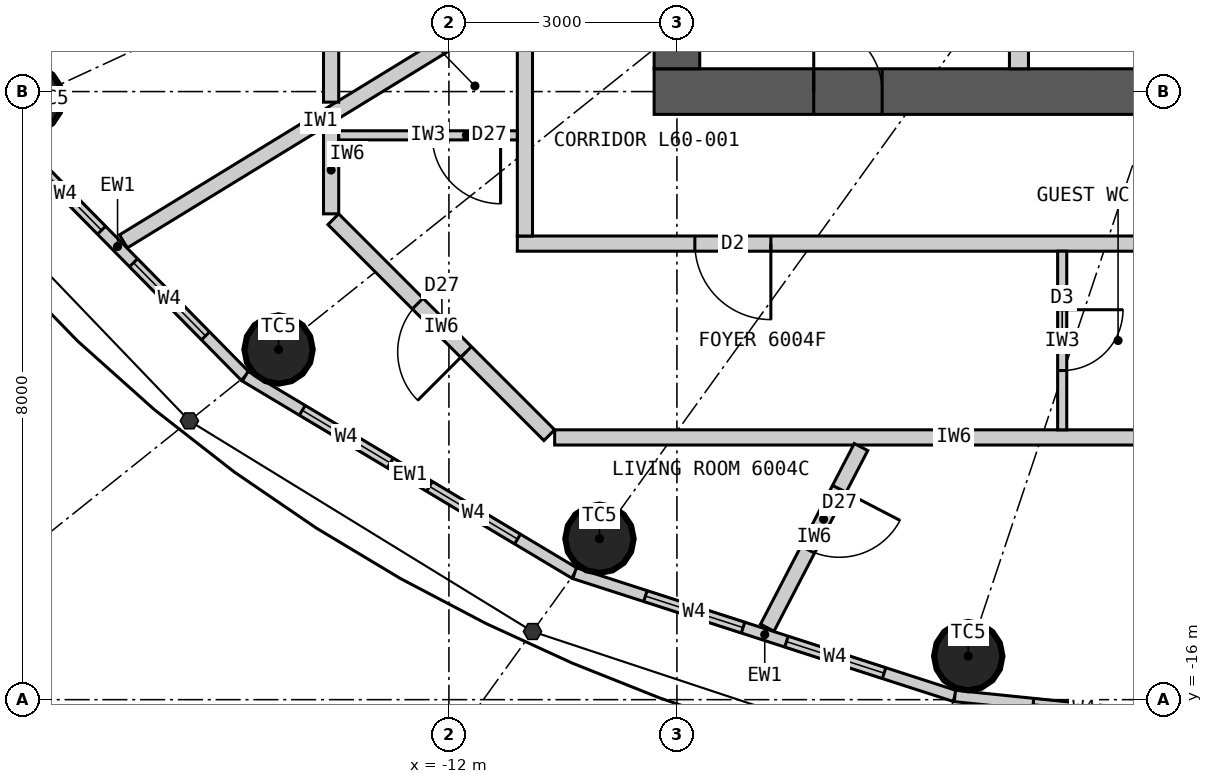
"""IFC4 building model, lengths in metres.
Left out: names, types, materials, properties, quantities, classifications, styles, units other than length and angle.
Written with IfcOpenShell. Run it as: python <this file> out.ifc"""

import sys

from ifc_helpers import new_model, si_unit, direction, frame, frame_2d, origin, origin_2d, place, context, subcontext, project, spatial, rectangle, circle, extrude, element, fill, save


model = new_model("IFC4")
c1 = context("Model", 3, precision=1e-05, world=origin(), true_north=direction((0.0, 1.0)))
c2 = subcontext(c1, "Body", "Model", "MODEL_VIEW")
j1 = project(units=[si_unit("LENGTHUNIT", "METRE"), si_unit("PLANEANGLEUNIT", "RADIAN")], contexts=[c1])
p1 = place(None, origin())
s1 = spatial("IfcSite", under=j1, at=p1, CompositionType="ELEMENT")
p2 = place(p1, origin())
s2 = spatial("IfcBuilding", under=s1, at=p2, CompositionType="ELEMENT")
p3 = place(p2, frame((0.0, 0.0, 222.6)))
s3 = spatial("IfcBuildingStorey", under=s2, at=p3, CompositionType="ELEMENT", Elevation=222.6)
for number, where, z_axis, x_axis in (
    (1, (-17.532, -8.098, 0.0), (0.0, 0.0, 1.0), (1.0, 0.0, 0.0)),
    (2, (-14.241, -11.393, 0.0), (0.0, 0.0, 1.0), (1.0, 0.0, 0.0)),
    (3, (-10.019, -13.883, 0.0), (0.0, 0.0, 1.0), (1.0, 0.0, 0.0)),
    (4, (-5.167, -15.427, 0.0), (0.0, 0.0, 1.0), (1.0, 0.0, 0.0)),
):
    element("IfcColumn", number, at=place(p3, frame(where, z_axis=z_axis, x_axis=x_axis)), inside=s3, PredefinedType="COLUMN", context=c2, shape_type="SweptSolid", body=[
        extrude(circle(Radius=0.45, at=origin_2d()), origin(), (0.0, 0.0, 1.0), 3.3),
    ])
p4 = place(p3, frame((9.3, -8.0, 0.0), z_axis=(0.0, 0.0, 1.0), x_axis=(-1.0, 0.0, 0.0)))
e5 = element("IfcWall", 5, at=p4, inside=s3, PredefinedType="SHEAR", context=c2, shape_type="SweptSolid", body=[
    extrude(rectangle(XDim=18.6, YDim=0.6, at=frame_2d((9.3, 0.0))), origin(), (0.0, 0.0, 1.0), 3.3),
])
p5 = place(p4, frame((8.0, 0.0, 0.0)))
e6 = element("IfcOpeningElement", 6, at=p5, cuts=e5, PredefinedType="OPENING", context=c2, shape_type="SweptSolid", body=[
    extrude(rectangle(XDim=1.2, YDim=2.2, at=frame_2d((0.6, 1.1))), frame((0.0, 0.31, 0.0), z_axis=(0.0, -1.0, 0.0), x_axis=(1.0, 0.0, 0.0)), (0.0, 0.0, 1.0), 0.62),
])
p6 = place(p4, frame((15.6, 0.0, 0.0)))
e7 = element("IfcOpeningElement", 7, at=p6, cuts=e5, PredefinedType="OPENING", context=c2, shape_type="SweptSolid", body=[
    extrude(rectangle(XDim=0.9, YDim=2.2, at=frame_2d((0.45, 1.1))), frame((0.0, 0.31, 0.0), z_axis=(0.0, -1.0, 0.0), x_axis=(1.0, 0.0, 0.0)), (0.0, 0.0, 1.0), 0.62),
])
p7 = place(p3, frame((-9.0, 7.7, 0.0), z_axis=(0.0, 0.0, 1.0), x_axis=(0.0, -1.0, 0.0)))
e8 = element("IfcWall", 8, at=p7, inside=s3, PredefinedType="SHEAR", context=c2, shape_type="SweptSolid", body=[
    extrude(rectangle(XDim=15.4, YDim=0.6, at=frame_2d((7.7, 0.0))), origin(), (0.0, 0.0, 1.0), 3.3),
])
p8 = place(p7, frame((6.8, 0.0, 0.0)))
e9 = element("IfcOpeningElement", 9, at=p8, cuts=e8, PredefinedType="OPENING", context=c2, shape_type="SweptSolid", body=[
    extrude(rectangle(XDim=1.8, YDim=2.2, at=frame_2d((0.9, 1.1))), frame((0.0, 0.31, 0.0), z_axis=(0.0, -1.0, 0.0), x_axis=(1.0, 0.0, 0.0)), (0.0, 0.0, 1.0), 0.62),
])
p9 = place(p3, frame((-4.5, -7.7, 0.0), z_axis=(0.0, 0.0, 1.0), x_axis=(0.0, 1.0, 0.0)))
e10 = element("IfcWall", 10, at=p9, inside=s3, PredefinedType="PARTITIONING", context=c2, shape_type="SweptSolid", body=[
    extrude(rectangle(XDim=3.2, YDim=0.25, at=frame_2d((1.6, 0.0))), origin(), (0.0, 0.0, 1.0), 3.3),
])
p10 = place(p3, frame((-18.04, -8.332, 0.0), z_axis=(0.0, 0.0, 1.0), x_axis=(0.701527379618, -0.712642501993, 0.0)))
e11 = element("IfcWall", 11, at=p10, inside=s3, PredefinedType="ELEMENTEDWALL", context=c2, shape_type="SweptSolid", body=[
    extrude(rectangle(XDim=4.788, YDim=0.15, at=frame_2d((2.394, 0.0))), origin(), (0.0, 0.0, 1.0), 3.12),
])
p11 = place(p10, frame((0.744, 0.0, 0.9)))
e12 = element("IfcOpeningElement", 12, at=p11, cuts=e11, PredefinedType="OPENING", context=c2, shape_type="SweptSolid", body=[
    extrude(rectangle(XDim=1.35, YDim=1.9, at=frame_2d((0.675, 0.95))), frame((0.0, 0.085, 0.0), z_axis=(0.0, -1.0, 0.0), x_axis=(1.0, 0.0, 0.0)), (0.0, 0.0, 1.0), 0.17),
])
p12 = place(p10, frame((2.694, 0.0, 0.9)))
e13 = element("IfcOpeningElement", 13, at=p12, cuts=e11, PredefinedType="OPENING", context=c2, shape_type="SweptSolid", body=[
    extrude(rectangle(XDim=1.35, YDim=1.9, at=frame_2d((0.675, 0.95))), frame((0.0, 0.085, 0.0), z_axis=(0.0, -1.0, 0.0), x_axis=(1.0, 0.0, 0.0)), (0.0, 0.0, 1.0), 0.17),
])
p13 = place(p3, frame((-14.68, -11.744, 0.0), z_axis=(0.0, 0.0, 1.0), x_axis=(0.85822150553, -0.513279502265, 0.0)))
e14 = element("IfcWall", 14, at=p13, inside=s3, PredefinedType="ELEMENTEDWALL", context=c2, shape_type="SweptSolid", body=[
    extrude(rectangle(XDim=5.05, YDim=0.15, at=frame_2d((2.525, 0.0))), origin(), (0.0, 0.0, 1.0), 3.12),
])
p14 = place(p13, frame((0.875, 0.0, 0.9)))
e15 = element("IfcOpeningElement", 15, at=p14, cuts=e14, PredefinedType="OPENING", context=c2, shape_type="SweptSolid", body=[
    extrude(rectangle(XDim=1.35, YDim=1.9, at=frame_2d((0.675, 0.95))), frame((0.0, 0.085, 0.0), z_axis=(0.0, -1.0, 0.0), x_axis=(1.0, 0.0, 0.0)), (0.0, 0.0, 1.0), 0.17),
])
p15 = place(p13, frame((2.825, 0.0, 0.9)))
e16 = element("IfcOpeningElement", 16, at=p15, cuts=e14, PredefinedType="OPENING", context=c2, shape_type="SweptSolid", body=[
    extrude(rectangle(XDim=1.35, YDim=1.9, at=frame_2d((0.675, 0.95))), frame((0.0, 0.085, 0.0), z_axis=(0.0, -1.0, 0.0), x_axis=(1.0, 0.0, 0.0)), (0.0, 0.0, 1.0), 0.17),
])
p16 = place(p3, frame((-10.346, -14.336, 0.0), z_axis=(0.0, 0.0, 1.0), x_axis=(0.951644702515, -0.307200846638, 0.0)))
e17 = element("IfcWall", 17, at=p16, inside=s3, PredefinedType="ELEMENTEDWALL", context=c2, shape_type="SweptSolid", body=[
    extrude(rectangle(XDim=5.258, YDim=0.15, at=frame_2d((2.629, 0.0))), origin(), (0.0, 0.0, 1.0), 3.12),
])
p17 = place(p16, frame((0.979, 0.0, 0.9)))
e18 = element("IfcOpeningElement", 18, at=p17, cuts=e17, PredefinedType="OPENING", context=c2, shape_type="SweptSolid", body=[
    extrude(rectangle(XDim=1.35, YDim=1.9, at=frame_2d((0.675, 0.95))), frame((0.0, 0.085, 0.0), z_axis=(0.0, -1.0, 0.0), x_axis=(1.0, 0.0, 0.0)), (0.0, 0.0, 1.0), 0.17),
])
p18 = place(p16, frame((2.929, 0.0, 0.9)))
e19 = element("IfcOpeningElement", 19, at=p18, cuts=e17, PredefinedType="OPENING", context=c2, shape_type="SweptSolid", body=[
    extrude(rectangle(XDim=1.35, YDim=1.9, at=frame_2d((0.675, 0.95))), frame((0.0, 0.085, 0.0), z_axis=(0.0, -1.0, 0.0), x_axis=(1.0, 0.0, 0.0)), (0.0, 0.0, 1.0), 0.17),
])
p19 = place(p3, frame((-5.343, -15.952, 0.0), z_axis=(0.0, 0.0, 1.0), x_axis=(0.994774574972, -0.102095763818, 0.0)))
e20 = element("IfcWall", 20, at=p19, inside=s3, PredefinedType="ELEMENTEDWALL", context=c2, shape_type="SweptSolid", body=[
    extrude(rectangle(XDim=5.371, YDim=0.15, at=frame_2d((2.686, 0.0))), origin(), (0.0, 0.0, 1.0), 3.12),
])
p20 = place(p19, frame((1.035, 0.0, 0.9)))
e21 = element("IfcOpeningElement", 21, at=p20, cuts=e20, PredefinedType="OPENING", context=c2, shape_type="SweptSolid", body=[
    extrude(rectangle(XDim=1.35, YDim=1.9, at=frame_2d((0.675, 0.95))), frame((0.0, 0.085, 0.0), z_axis=(0.0, -1.0, 0.0), x_axis=(1.0, 0.0, 0.0)), (0.0, 0.0, 1.0), 0.17),
])
p21 = place(p19, frame((2.985, 0.0, 0.9)))
e22 = element("IfcOpeningElement", 22, at=p21, cuts=e20, PredefinedType="OPENING", context=c2, shape_type="SweptSolid", body=[
    extrude(rectangle(XDim=1.35, YDim=1.9, at=frame_2d((0.675, 0.95))), frame((0.0, 0.085, 0.0), z_axis=(0.0, -1.0, 0.0), x_axis=(1.0, 0.0, 0.0)), (0.0, 0.0, 1.0), 0.17),
])
p22 = place(p3, frame((11.1, -10.0, 0.0), z_axis=(0.0, 0.0, 1.0), x_axis=(-1.0, 0.0, 0.0)))
e23 = element("IfcWall", 23, at=p22, inside=s3, PredefinedType="PARTITIONING", context=c2, shape_type="SweptSolid", body=[
    extrude(rectangle(XDim=22.2, YDim=0.2, at=frame_2d((11.1, 0.0))), origin(), (0.0, 0.0, 1.0), 3.12),
])
p23 = place(p22, frame((18.864, 0.0, 0.0)))
e24 = element("IfcOpeningElement", 24, at=p23, cuts=e23, PredefinedType="OPENING", context=c2, shape_type="SweptSolid", body=[
    extrude(rectangle(XDim=1.0, YDim=2.2, at=frame_2d((0.5, 1.1))), frame((0.0, 0.11, 0.0), z_axis=(0.0, -1.0, 0.0), x_axis=(1.0, 0.0, 0.0)), (0.0, 0.0, 1.0), 0.22),
])
p24 = place(p22, frame((2.309, 0.0, 0.0)))
e25 = element("IfcOpeningElement", 25, at=p24, cuts=e23, PredefinedType="OPENING", context=c2, shape_type="SweptSolid", body=[
    extrude(rectangle(XDim=1.0, YDim=2.2, at=frame_2d((0.5, 1.1))), frame((0.0, 0.11, 0.0), z_axis=(0.0, -1.0, 0.0), x_axis=(1.0, 0.0, 0.0)), (0.0, 0.0, 1.0), 0.22),
])
p25 = place(p3, frame((-11.0, -2.234, 0.0), z_axis=(0.0, 0.0, 1.0), x_axis=(0.0, -1.0, 0.0)))
e26 = element("IfcWall", 26, at=p25, inside=s3, PredefinedType="PARTITIONING", context=c2, shape_type="SweptSolid", body=[
    extrude(rectangle(XDim=7.666, YDim=0.2, at=frame_2d((3.833, 0.0))), origin(), (0.0, 0.0, 1.0), 3.12),
])
p26 = place(p3, frame((-11.1, -6.797, 0.0), z_axis=(0.0, 0.0, 1.0), x_axis=(-0.852799818179, -0.522237943963, 0.0)))
e27 = element("IfcWall", 27, at=p26, inside=s3, PredefinedType="PARTITIONING", context=c2, shape_type="SweptSolid", body=[
    extrude(rectangle(XDim=6.077, YDim=0.2, at=frame_2d((3.039, 0.0))), origin(), (0.0, 0.0, 1.0), 3.12),
])
p27 = place(p3, frame((-13.55, 4.357, 0.0), z_axis=(0.0, 0.0, 1.0), x_axis=(0.0, -1.0, 0.0)))
e28 = element("IfcWall", 28, at=p27, inside=s3, PredefinedType="PARTITIONING", context=c2, shape_type="SweptSolid", body=[
    extrude(rectangle(XDim=12.496, YDim=0.2, at=frame_2d((6.248, 0.0))), origin(), (0.0, 0.0, 1.0), 3.12),
])
p28 = place(p27, frame((1.92, 0.0, 0.0)))
e29 = element("IfcOpeningElement", 29, at=p28, cuts=e28, PredefinedType="OPENING", context=c2, shape_type="SweptSolid", body=[
    extrude(rectangle(XDim=0.8, YDim=2.1, at=frame_2d((0.4, 1.05))), frame((0.0, 0.11, 0.0), z_axis=(0.0, -1.0, 0.0), x_axis=(1.0, 0.0, 0.0)), (0.0, 0.0, 1.0), 0.22),
])
p29 = place(p27, frame((9.27, 0.0, 0.0)))
e30 = element("IfcOpeningElement", 30, at=p29, cuts=e28, PredefinedType="OPENING", context=c2, shape_type="SweptSolid", body=[
    extrude(rectangle(XDim=0.8, YDim=2.1, at=frame_2d((0.4, 1.05))), frame((0.0, 0.11, 0.0), z_axis=(0.0, -1.0, 0.0), x_axis=(1.0, 0.0, 0.0)), (0.0, 0.0, 1.0), 0.22),
])
p30 = place(p27, frame((5.557, 0.0, 0.0)))
e31 = element("IfcOpeningElement", 31, at=p30, cuts=e28, PredefinedType="OPENING", context=c2, shape_type="SweptSolid", body=[
    extrude(rectangle(XDim=0.9, YDim=2.1, at=frame_2d((0.45, 1.05))), frame((0.0, 0.11, 0.0), z_axis=(0.0, -1.0, 0.0), x_axis=(1.0, 0.0, 0.0)), (0.0, 0.0, 1.0), 0.22),
])
p31 = place(p3, frame((-13.55, -8.456, 0.0), z_axis=(0.0, 0.0, 1.0), x_axis=(0.0, -1.0, 0.0)))
e32 = element("IfcWall", 32, at=p31, inside=s3, PredefinedType="PARTITIONING", context=c2, shape_type="SweptSolid", body=[
    extrude(rectangle(XDim=1.153, YDim=0.2, at=frame_2d((0.576, 0.0))), origin(), (0.0, 0.0, 1.0), 3.12),
])
p32 = place(p3, frame((-13.521, -9.679, 0.0), z_axis=(0.0, 0.0, 1.0), x_axis=(0.707106781187, -0.707106781187, 0.0)))
e33 = element("IfcWall", 33, at=p32, inside=s3, PredefinedType="PARTITIONING", context=c2, shape_type="SweptSolid", body=[
    extrude(rectangle(XDim=4.019, YDim=0.2, at=frame_2d((2.009, 0.0))), origin(), (0.0, 0.0, 1.0), 3.12),
])
p33 = place(p32, frame((1.57, 0.0, 0.0)))
e34 = element("IfcOpeningElement", 34, at=p33, cuts=e33, PredefinedType="OPENING", context=c2, shape_type="SweptSolid", body=[
    extrude(rectangle(XDim=0.9, YDim=2.1, at=frame_2d((0.45, 1.05))), frame((0.0, 0.11, 0.0), z_axis=(0.0, -1.0, 0.0), x_axis=(1.0, 0.0, 0.0)), (0.0, 0.0, 1.0), 0.22),
])
p34 = place(p3, frame((-10.609, -12.55, 0.0), z_axis=(0.0, 0.0, 1.0), x_axis=(1.0, 0.0, 0.0)))
e35 = element("IfcWall", 35, at=p34, inside=s3, PredefinedType="PARTITIONING", context=c2, shape_type="SweptSolid", body=[
    extrude(rectangle(XDim=10.508, YDim=0.2, at=frame_2d((5.254, 0.0))), origin(), (0.0, 0.0, 1.0), 3.12),
])
p35 = place(p34, frame((8.308, 0.0, 0.0)))
e36 = element("IfcOpeningElement", 36, at=p35, cuts=e35, PredefinedType="OPENING", context=c2, shape_type="SweptSolid", body=[
    extrude(rectangle(XDim=0.8, YDim=2.1, at=frame_2d((0.4, 1.05))), frame((0.0, 0.11, 0.0), z_axis=(0.0, -1.0, 0.0), x_axis=(1.0, 0.0, 0.0)), (0.0, 0.0, 1.0), 0.22),
])
p36 = place(p3, frame((-6.578, -12.677, 0.0), z_axis=(0.0, 0.0, 1.0), x_axis=(-0.460620531465, -0.887597164255, 0.0)))
e37 = element("IfcWall", 37, at=p36, inside=s3, PredefinedType="PARTITIONING", context=c2, shape_type="SweptSolid", body=[
    extrude(rectangle(XDim=2.678, YDim=0.2, at=frame_2d((1.339, 0.0))), origin(), (0.0, 0.0, 1.0), 3.12),
])
p37 = place(p36, frame((0.62, 0.0, 0.0)))
e38 = element("IfcOpeningElement", 38, at=p37, cuts=e37, PredefinedType="OPENING", context=c2, shape_type="SweptSolid", body=[
    extrude(rectangle(XDim=0.9, YDim=2.1, at=frame_2d((0.45, 1.05))), frame((0.0, 0.11, 0.0), z_axis=(0.0, -1.0, 0.0), x_axis=(1.0, 0.0, 0.0)), (0.0, 0.0, 1.0), 0.22),
])
p38 = place(p3, frame((-11.1, -8.576, 0.0), z_axis=(0.0, 0.0, 1.0), x_axis=(-1.0, 0.0, 0.0)))
e39 = element("IfcWall", 39, at=p38, inside=s3, PredefinedType="PARTITIONING", context=c2, shape_type="SweptSolid", body=[
    extrude(rectangle(XDim=2.35, YDim=0.12, at=frame_2d((1.175, 0.0))), origin(), (0.0, 0.0, 1.0), 3.12),
])
p39 = place(p38, frame((0.22, 0.0, 0.0)))
e40 = element("IfcOpeningElement", 40, at=p39, cuts=e39, PredefinedType="OPENING", context=c2, shape_type="SweptSolid", body=[
    extrude(rectangle(XDim=0.9, YDim=2.1, at=frame_2d((0.45, 1.05))), frame((0.0, 0.07, 0.0), z_axis=(0.0, -1.0, 0.0), x_axis=(1.0, 0.0, 0.0)), (0.0, 0.0, 1.0), 0.14),
])
p40 = place(p3, frame((-3.931, -10.1, 0.0), z_axis=(0.0, 0.0, 1.0), x_axis=(0.0, -1.0, 0.0)))
e41 = element("IfcWall", 41, at=p40, inside=s3, PredefinedType="PARTITIONING", context=c2, shape_type="SweptSolid", body=[
    extrude(rectangle(XDim=2.35, YDim=0.12, at=frame_2d((1.175, 0.0))), origin(), (0.0, 0.0, 1.0), 3.12),
])
p41 = place(p40, frame((0.77, 0.0, 0.0)))
e42 = element("IfcOpeningElement", 42, at=p41, cuts=e41, PredefinedType="OPENING", context=c2, shape_type="SweptSolid", body=[
    extrude(rectangle(XDim=0.8, YDim=2.1, at=frame_2d((0.4, 1.05))), frame((0.0, 0.07, 0.0), z_axis=(0.0, -1.0, 0.0), x_axis=(1.0, 0.0, 0.0)), (0.0, 0.0, 1.0), 0.14),
])
p42 = place(p11, origin())
e43 = element("IfcWindow", 43, at=p42, inside=s3, PartitioningType="SINGLE_PANEL", PredefinedType="WINDOW", context=c2, shape_type="SweptSolid", body=[
    extrude(rectangle(XDim=1.35, YDim=1.9, at=frame_2d((0.675, 0.95))), frame((0.0, 0.03, 0.0), z_axis=(0.0, -1.0, 0.0), x_axis=(1.0, 0.0, 0.0)), (0.0, 0.0, 1.0), 0.06),
])
fill(e12, e43)
p43 = place(p12, origin())
e44 = element("IfcWindow", 44, at=p43, inside=s3, PartitioningType="SINGLE_PANEL", PredefinedType="WINDOW", context=c2, shape_type="SweptSolid", body=[
    extrude(rectangle(XDim=1.35, YDim=1.9, at=frame_2d((0.675, 0.95))), frame((0.0, 0.03, 0.0), z_axis=(0.0, -1.0, 0.0), x_axis=(1.0, 0.0, 0.0)), (0.0, 0.0, 1.0), 0.06),
])
fill(e13, e44)
p44 = place(p14, origin())
e45 = element("IfcWindow", 45, at=p44, inside=s3, PartitioningType="SINGLE_PANEL", PredefinedType="WINDOW", context=c2, shape_type="SweptSolid", body=[
    extrude(rectangle(XDim=1.35, YDim=1.9, at=frame_2d((0.675, 0.95))), frame((0.0, 0.03, 0.0), z_axis=(0.0, -1.0, 0.0), x_axis=(1.0, 0.0, 0.0)), (0.0, 0.0, 1.0), 0.06),
])
fill(e15, e45)
p45 = place(p15, origin())
e46 = element("IfcWindow", 46, at=p45, inside=s3, PartitioningType="SINGLE_PANEL", PredefinedType="WINDOW", context=c2, shape_type="SweptSolid", body=[
    extrude(rectangle(XDim=1.35, YDim=1.9, at=frame_2d((0.675, 0.95))), frame((0.0, 0.03, 0.0), z_axis=(0.0, -1.0, 0.0), x_axis=(1.0, 0.0, 0.0)), (0.0, 0.0, 1.0), 0.06),
])
fill(e16, e46)
p46 = place(p17, origin())
e47 = element("IfcWindow", 47, at=p46, inside=s3, PartitioningType="SINGLE_PANEL", PredefinedType="WINDOW", context=c2, shape_type="SweptSolid", body=[
    extrude(rectangle(XDim=1.35, YDim=1.9, at=frame_2d((0.675, 0.95))), frame((0.0, 0.03, 0.0), z_axis=(0.0, -1.0, 0.0), x_axis=(1.0, 0.0, 0.0)), (0.0, 0.0, 1.0), 0.06),
])
fill(e18, e47)
p47 = place(p18, origin())
e48 = element("IfcWindow", 48, at=p47, inside=s3, PartitioningType="SINGLE_PANEL", PredefinedType="WINDOW", context=c2, shape_type="SweptSolid", body=[
    extrude(rectangle(XDim=1.35, YDim=1.9, at=frame_2d((0.675, 0.95))), frame((0.0, 0.03, 0.0), z_axis=(0.0, -1.0, 0.0), x_axis=(1.0, 0.0, 0.0)), (0.0, 0.0, 1.0), 0.06),
])
fill(e19, e48)
p48 = place(p20, origin())
e49 = element("IfcWindow", 49, at=p48, inside=s3, PartitioningType="SINGLE_PANEL", PredefinedType="WINDOW", context=c2, shape_type="SweptSolid", body=[
    extrude(rectangle(XDim=1.35, YDim=1.9, at=frame_2d((0.675, 0.95))), frame((0.0, 0.03, 0.0), z_axis=(0.0, -1.0, 0.0), x_axis=(1.0, 0.0, 0.0)), (0.0, 0.0, 1.0), 0.06),
])
fill(e21, e49)
p49 = place(p23, origin())
e50 = element("IfcDoor", 50, at=p49, inside=s3, OperationType="SINGLE_SWING_LEFT", PredefinedType="DOOR", context=c2, shape_type="SweptSolid", body=[
    extrude(rectangle(XDim=1.0, YDim=2.2, at=frame_2d((0.5, 1.1))), frame((0.0, 0.025, 0.0), z_axis=(0.0, -1.0, 0.0), x_axis=(1.0, 0.0, 0.0)), (0.0, 0.0, 1.0), 0.05),
])
fill(e24, e50)
p50 = place(p39, origin())
e51 = element("IfcDoor", 51, at=p50, inside=s3, OperationType="SINGLE_SWING_LEFT", PredefinedType="DOOR", context=c2, shape_type="SweptSolid", body=[
    extrude(rectangle(XDim=0.9, YDim=2.1, at=frame_2d((0.45, 1.05))), frame((0.0, 0.025, 0.0), z_axis=(0.0, -1.0, 0.0), x_axis=(1.0, 0.0, 0.0)), (0.0, 0.0, 1.0), 0.05),
])
fill(e40, e51)
p51 = place(p41, origin())
e52 = element("IfcDoor", 52, at=p51, inside=s3, OperationType="SINGLE_SWING_LEFT", PredefinedType="DOOR", context=c2, shape_type="SweptSolid", body=[
    extrude(rectangle(XDim=0.8, YDim=2.1, at=frame_2d((0.4, 1.05))), frame((0.0, 0.025, 0.0), z_axis=(0.0, -1.0, 0.0), x_axis=(1.0, 0.0, 0.0)), (0.0, 0.0, 1.0), 0.05),
])
fill(e42, e52)
p52 = place(p33, origin())
e53 = element("IfcDoor", 53, at=p52, inside=s3, OperationType="SINGLE_SWING_RIGHT", PredefinedType="DOOR", context=c2, shape_type="SweptSolid", body=[
    extrude(rectangle(XDim=0.9, YDim=2.1, at=frame_2d((0.45, 1.05))), frame((0.0, 0.025, 0.0), z_axis=(0.0, -1.0, 0.0), x_axis=(1.0, 0.0, 0.0)), (0.0, 0.0, 1.0), 0.05),
])
fill(e34, e53)
p53 = place(p37, origin())
e54 = element("IfcDoor", 54, at=p53, inside=s3, OperationType="SINGLE_SWING_LEFT", PredefinedType="DOOR", context=c2, shape_type="SweptSolid", body=[
    extrude(rectangle(XDim=0.9, YDim=2.1, at=frame_2d((0.45, 1.05))), frame((0.0, 0.025, 0.0), z_axis=(0.0, -1.0, 0.0), x_axis=(1.0, 0.0, 0.0)), (0.0, 0.0, 1.0), 0.05),
])
fill(e38, e54)
p54 = place(p6, origin())
e55 = element("IfcDoor", 55, at=p54, inside=s3, OperationType="SINGLE_SWING_RIGHT", PredefinedType="DOOR", context=c2, shape_type="SweptSolid", body=[
    extrude(rectangle(XDim=0.9, YDim=2.2, at=frame_2d((0.45, 1.1))), frame((0.0, 0.025, 0.0), z_axis=(0.0, -1.0, 0.0), x_axis=(1.0, 0.0, 0.0)), (0.0, 0.0, 1.0), 0.05),
])
fill(e7, e55)
save(model, sys.argv[1])
